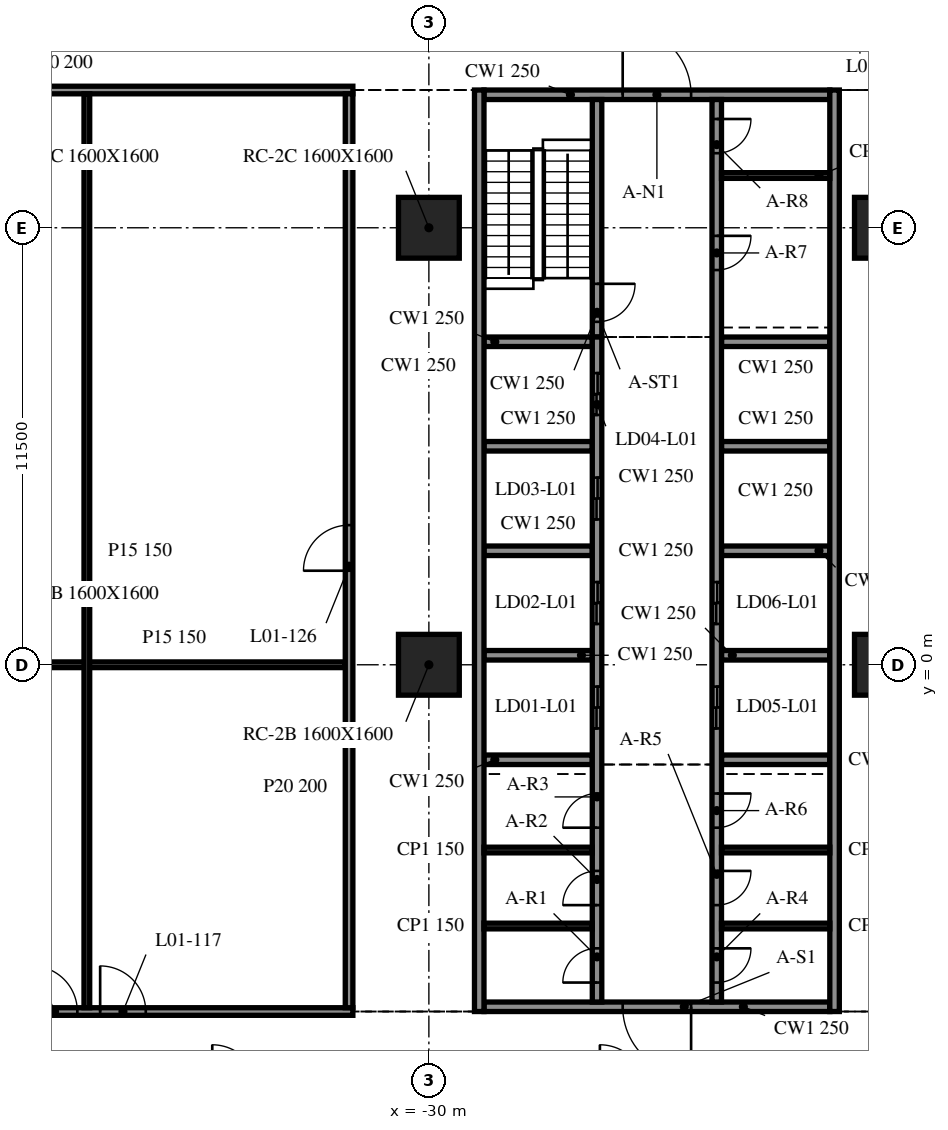
"""IFC4 building model, lengths in metres.
Left out: names, types, materials, properties, quantities, classifications, styles, units other than length and angle.
Written with IfcOpenShell. Run it as: python <this file> out.ifc"""

import sys

from ifc_helpers import new_model, si_unit, direction, frame, frame_2d, origin, origin_2d, place, context, subcontext, project, spatial, rectangle, extrude, element, fill, save


model = new_model("IFC4")
c1 = context("Model", 3, precision=1e-05, world=origin(), true_north=direction((0.0, 1.0)))
c2 = subcontext(c1, "Body", "Model", "MODEL_VIEW")
j1 = project(units=[si_unit("LENGTHUNIT", "METRE"), si_unit("PLANEANGLEUNIT", "RADIAN")], contexts=[c1])
p1 = place(None, origin())
s1 = spatial("IfcSite", under=j1, at=p1, CompositionType="ELEMENT")
p2 = place(p1, origin())
s2 = spatial("IfcBuilding", under=s1, at=p2, CompositionType="ELEMENT")
p3 = place(p2, frame((0.0, 0.0, 7.2)))
s3 = spatial("IfcBuildingStorey", under=s2, at=p3, CompositionType="ELEMENT", Elevation=7.2)
for number, where, z_axis, x_axis in (
    (1, (-30.0, 0.0, -0.34), (0.0, 0.0, 1.0), (1.0, 0.0, 0.0)),
    (2, (-30.0, 11.5, -0.34), (0.0, 0.0, 1.0), (1.0, 0.0, 0.0)),
    (3, (-18.0, 0.0, -0.34), (0.0, 0.0, 1.0), (1.0, 0.0, 0.0)),
    (4, (-18.0, 11.5, -0.34), (0.0, 0.0, 1.0), (1.0, 0.0, 0.0)),
):
    element("IfcColumn", number, at=place(p3, frame(where, z_axis=z_axis, x_axis=x_axis)), inside=s3, PredefinedType="COLUMN", context=c2, shape_type="SweptSolid", body=[
        extrude(rectangle(XDim=1.6, YDim=1.6, at=origin_2d()), origin(), (0.0, 0.0, 1.0), 4.3),
    ])
for number, where, z_axis, x_axis in (
    (5, (-28.675, 15.125, 0.0), (0.0, 0.0, 1.0), (0.0, -1.0, 0.0)),
    (6, (-19.325, -9.125, 0.0), (0.0, 0.0, 1.0), (0.0, 1.0, 0.0)),
):
    element("IfcWall", number, at=place(p3, frame(where, z_axis=z_axis, x_axis=x_axis)), inside=s3, PredefinedType="SOLIDWALL", context=c2, shape_type="SweptSolid", body=[
        extrude(rectangle(XDim=24.25, YDim=0.25, at=frame_2d((12.125, 0.0))), origin(), (0.0, 0.0, 1.0), 3.96),
    ])
p4 = place(p3, frame((-19.45, -9.0, 0.0), z_axis=(0.0, 0.0, 1.0), x_axis=(-1.0, 0.0, 0.0)))
e7 = element("IfcWall", 7, at=p4, inside=s3, PredefinedType="SOLIDWALL", context=c2, shape_type="SweptSolid", body=[
    extrude(rectangle(XDim=9.1, YDim=0.25, at=frame_2d((4.55, 0.0))), origin(), (0.0, 0.0, 1.0), 3.96),
])
p5 = place(p4, frame((3.65, 0.0, 0.0)))
e8 = element("IfcOpeningElement", 8, at=p5, cuts=e7, PredefinedType="OPENING", context=c2, shape_type="SweptSolid", body=[
    extrude(rectangle(XDim=1.8, YDim=2.1, at=frame_2d((0.9, 1.05))), frame((0.0, 0.135, 0.0), z_axis=(0.0, -1.0, 0.0), x_axis=(1.0, 0.0, 0.0)), (0.0, 0.0, 1.0), 0.27),
])
p6 = place(p3, frame((-28.55, 15.0, 0.0), z_axis=(0.0, 0.0, 1.0), x_axis=(1.0, 0.0, 0.0)))
e9 = element("IfcWall", 9, at=p6, inside=s3, PredefinedType="SOLIDWALL", context=c2, shape_type="SweptSolid", body=[
    extrude(rectangle(XDim=9.1, YDim=0.25, at=frame_2d((4.55, 0.0))), origin(), (0.0, 0.0, 1.0), 3.96),
])
p7 = place(p6, frame((3.65, 0.0, 0.0)))
e10 = element("IfcOpeningElement", 10, at=p7, cuts=e9, PredefinedType="OPENING", context=c2, shape_type="SweptSolid", body=[
    extrude(rectangle(XDim=1.8, YDim=2.1, at=frame_2d((0.9, 1.05))), frame((0.0, 0.135, 0.0), z_axis=(0.0, -1.0, 0.0), x_axis=(1.0, 0.0, 0.0)), (0.0, 0.0, 1.0), 0.27),
])
p8 = place(p3, frame((-25.575, -8.875, 0.0), z_axis=(0.0, 0.0, 1.0), x_axis=(0.0, 1.0, 0.0)))
e11 = element("IfcWall", 11, at=p8, inside=s3, PredefinedType="SOLIDWALL", context=c2, shape_type="SweptSolid", body=[
    extrude(rectangle(XDim=17.5, YDim=0.25, at=frame_2d((8.75, 0.0))), origin(), (0.0, 0.0, 1.0), 3.96),
])
p9 = place(p8, frame((7.2, 0.0, 0.0)))
e12 = element("IfcOpeningElement", 12, at=p9, cuts=e11, PredefinedType="OPENING", context=c2, shape_type="SweptSolid", body=[
    extrude(rectangle(XDim=1.1, YDim=2.1, at=frame_2d((0.55, 1.05))), frame((0.0, 0.135, 0.0), z_axis=(0.0, -1.0, 0.0), x_axis=(1.0, 0.0, 0.0)), (0.0, 0.0, 1.0), 0.27),
])
p10 = place(p8, frame((9.95, 0.0, 0.0)))
e13 = element("IfcOpeningElement", 13, at=p10, cuts=e11, PredefinedType="OPENING", context=c2, shape_type="SweptSolid", body=[
    extrude(rectangle(XDim=1.1, YDim=2.1, at=frame_2d((0.55, 1.05))), frame((0.0, 0.135, 0.0), z_axis=(0.0, -1.0, 0.0), x_axis=(1.0, 0.0, 0.0)), (0.0, 0.0, 1.0), 0.27),
])
p11 = place(p8, frame((12.7, 0.0, 0.0)))
e14 = element("IfcOpeningElement", 14, at=p11, cuts=e11, PredefinedType="OPENING", context=c2, shape_type="SweptSolid", body=[
    extrude(rectangle(XDim=1.1, YDim=2.1, at=frame_2d((0.55, 1.05))), frame((0.0, 0.135, 0.0), z_axis=(0.0, -1.0, 0.0), x_axis=(1.0, 0.0, 0.0)), (0.0, 0.0, 1.0), 0.27),
])
p12 = place(p8, frame((15.45, 0.0, 0.0)))
e15 = element("IfcOpeningElement", 15, at=p12, cuts=e11, PredefinedType="OPENING", context=c2, shape_type="SweptSolid", body=[
    extrude(rectangle(XDim=1.1, YDim=2.1, at=frame_2d((0.55, 1.05))), frame((0.0, 0.135, 0.0), z_axis=(0.0, -1.0, 0.0), x_axis=(1.0, 0.0, 0.0)), (0.0, 0.0, 1.0), 0.27),
])
p13 = place(p8, frame((0.512, 0.0, 0.0)))
e16 = element("IfcOpeningElement", 16, at=p13, cuts=e11, PredefinedType="OPENING", context=c2, shape_type="SweptSolid", body=[
    extrude(rectangle(XDim=0.9, YDim=2.1, at=frame_2d((0.45, 1.05))), frame((0.0, 0.135, 0.0), z_axis=(0.0, -1.0, 0.0), x_axis=(1.0, 0.0, 0.0)), (0.0, 0.0, 1.0), 0.27),
])
p14 = place(p8, frame((2.55, 0.0, 0.0)))
e17 = element("IfcOpeningElement", 17, at=p14, cuts=e11, PredefinedType="OPENING", context=c2, shape_type="SweptSolid", body=[
    extrude(rectangle(XDim=0.9, YDim=2.1, at=frame_2d((0.45, 1.05))), frame((0.0, 0.135, 0.0), z_axis=(0.0, -1.0, 0.0), x_axis=(1.0, 0.0, 0.0)), (0.0, 0.0, 1.0), 0.27),
])
p15 = place(p8, frame((4.587, 0.0, 0.0)))
e18 = element("IfcOpeningElement", 18, at=p15, cuts=e11, PredefinedType="OPENING", context=c2, shape_type="SweptSolid", body=[
    extrude(rectangle(XDim=0.9, YDim=2.1, at=frame_2d((0.45, 1.05))), frame((0.0, 0.135, 0.0), z_axis=(0.0, -1.0, 0.0), x_axis=(1.0, 0.0, 0.0)), (0.0, 0.0, 1.0), 0.27),
])
p16 = place(p3, frame((-25.575, 14.875, 0.0), z_axis=(0.0, 0.0, 1.0), x_axis=(0.0, -1.0, 0.0)))
e19 = element("IfcWall", 19, at=p16, inside=s3, PredefinedType="SOLIDWALL", context=c2, shape_type="SweptSolid", body=[
    extrude(rectangle(XDim=6.25, YDim=0.25, at=frame_2d((3.125, 0.0))), origin(), (0.0, 0.0, 1.0), 3.96),
])
p17 = place(p16, frame((4.85, 0.0, 0.0)))
e20 = element("IfcOpeningElement", 20, at=p17, cuts=e19, PredefinedType="OPENING", context=c2, shape_type="SweptSolid", body=[
    extrude(rectangle(XDim=1.0, YDim=2.1, at=frame_2d((0.5, 1.05))), frame((0.0, 0.135, 0.0), z_axis=(0.0, -1.0, 0.0), x_axis=(1.0, 0.0, 0.0)), (0.0, 0.0, 1.0), 0.27),
])
p18 = place(p3, frame((-22.425, 14.875, 0.0), z_axis=(0.0, 0.0, 1.0), x_axis=(0.0, -1.0, 0.0)))
e21 = element("IfcWall", 21, at=p18, inside=s3, PredefinedType="SOLIDWALL", context=c2, shape_type="SweptSolid", body=[
    extrude(rectangle(XDim=23.75, YDim=0.25, at=frame_2d((11.875, 0.0))), origin(), (0.0, 0.0, 1.0), 3.96),
])
p19 = place(p18, frame((15.45, 0.0, 0.0)))
e22 = element("IfcOpeningElement", 22, at=p19, cuts=e21, PredefinedType="OPENING", context=c2, shape_type="SweptSolid", body=[
    extrude(rectangle(XDim=1.1, YDim=2.1, at=frame_2d((0.55, 1.05))), frame((0.0, 0.135, 0.0), z_axis=(0.0, -1.0, 0.0), x_axis=(1.0, 0.0, 0.0)), (0.0, 0.0, 1.0), 0.27),
])
p20 = place(p18, frame((12.7, 0.0, 0.0)))
e23 = element("IfcOpeningElement", 23, at=p20, cuts=e21, PredefinedType="OPENING", context=c2, shape_type="SweptSolid", body=[
    extrude(rectangle(XDim=1.1, YDim=2.1, at=frame_2d((0.55, 1.05))), frame((0.0, 0.135, 0.0), z_axis=(0.0, -1.0, 0.0), x_axis=(1.0, 0.0, 0.0)), (0.0, 0.0, 1.0), 0.27),
])
p21 = place(p18, frame((22.337, 0.0, 0.0)))
e24 = element("IfcOpeningElement", 24, at=p21, cuts=e21, PredefinedType="OPENING", context=c2, shape_type="SweptSolid", body=[
    extrude(rectangle(XDim=0.9, YDim=2.1, at=frame_2d((0.45, 1.05))), frame((0.0, 0.135, 0.0), z_axis=(0.0, -1.0, 0.0), x_axis=(1.0, 0.0, 0.0)), (0.0, 0.0, 1.0), 0.27),
])
p22 = place(p18, frame((20.3, 0.0, 0.0)))
e25 = element("IfcOpeningElement", 25, at=p22, cuts=e21, PredefinedType="OPENING", context=c2, shape_type="SweptSolid", body=[
    extrude(rectangle(XDim=0.9, YDim=2.1, at=frame_2d((0.45, 1.05))), frame((0.0, 0.135, 0.0), z_axis=(0.0, -1.0, 0.0), x_axis=(1.0, 0.0, 0.0)), (0.0, 0.0, 1.0), 0.27),
])
p23 = place(p18, frame((18.262, 0.0, 0.0)))
e26 = element("IfcOpeningElement", 26, at=p23, cuts=e21, PredefinedType="OPENING", context=c2, shape_type="SweptSolid", body=[
    extrude(rectangle(XDim=0.9, YDim=2.1, at=frame_2d((0.45, 1.05))), frame((0.0, 0.135, 0.0), z_axis=(0.0, -1.0, 0.0), x_axis=(1.0, 0.0, 0.0)), (0.0, 0.0, 1.0), 0.27),
])
p24 = place(p18, frame((3.587, 0.0, 0.0)))
e27 = element("IfcOpeningElement", 27, at=p24, cuts=e21, PredefinedType="OPENING", context=c2, shape_type="SweptSolid", body=[
    extrude(rectangle(XDim=0.9, YDim=2.1, at=frame_2d((0.45, 1.05))), frame((0.0, 0.135, 0.0), z_axis=(0.0, -1.0, 0.0), x_axis=(1.0, 0.0, 0.0)), (0.0, 0.0, 1.0), 0.27),
])
p25 = place(p18, frame((0.512, 0.0, 0.0)))
e28 = element("IfcOpeningElement", 28, at=p25, cuts=e21, PredefinedType="OPENING", context=c2, shape_type="SweptSolid", body=[
    extrude(rectangle(XDim=0.9, YDim=2.1, at=frame_2d((0.45, 1.05))), frame((0.0, 0.135, 0.0), z_axis=(0.0, -1.0, 0.0), x_axis=(1.0, 0.0, 0.0)), (0.0, 0.0, 1.0), 0.27),
])
for number, where, z_axis, x_axis in (
    (29, (-28.55, -2.5, 0.0), (0.0, 0.0, 1.0), (1.0, 0.0, 0.0)),
    (30, (-28.55, 0.25, 0.0), (0.0, 0.0, 1.0), (1.0, 0.0, 0.0)),
    (31, (-28.55, 3.0, 0.0), (0.0, 0.0, 1.0), (1.0, 0.0, 0.0)),
    (32, (-28.55, 5.75, 0.0), (0.0, 0.0, 1.0), (1.0, 0.0, 0.0)),
    (33, (-28.55, 8.5, 0.0), (0.0, 0.0, 1.0), (1.0, 0.0, 0.0)),
    (34, (-22.3, -2.5, 0.0), (0.0, 0.0, 1.0), (1.0, 0.0, 0.0)),
    (35, (-22.3, 0.25, 0.0), (0.0, 0.0, 1.0), (1.0, 0.0, 0.0)),
    (36, (-22.3, 3.0, 0.0), (0.0, 0.0, 1.0), (1.0, 0.0, 0.0)),
    (37, (-22.3, 5.75, 0.0), (0.0, 0.0, 1.0), (1.0, 0.0, 0.0)),
    (38, (-22.3, 8.5, 0.0), (0.0, 0.0, 1.0), (1.0, 0.0, 0.0)),
):
    element("IfcWall", number, at=place(p3, frame(where, z_axis=z_axis, x_axis=x_axis)), inside=s3, PredefinedType="SOLIDWALL", context=c2, shape_type="SweptSolid", body=[
        extrude(rectangle(XDim=2.85, YDim=0.25, at=frame_2d((1.425, 0.0))), origin(), (0.0, 0.0, 1.0), 3.96),
    ])
for number, where, z_axis, x_axis in (
    (39, (-28.55, -6.875, 0.0), (0.0, 0.0, 1.0), (1.0, 0.0, 0.0)),
    (40, (-28.55, -4.875, 0.0), (0.0, 0.0, 1.0), (1.0, 0.0, 0.0)),
    (41, (-22.3, -6.875, 0.0), (0.0, 0.0, 1.0), (1.0, 0.0, 0.0)),
    (42, (-22.3, -4.875, 0.0), (0.0, 0.0, 1.0), (1.0, 0.0, 0.0)),
    (43, (-22.3, 12.875, 0.0), (0.0, 0.0, 1.0), (1.0, 0.0, 0.0)),
):
    element("IfcWall", number, at=place(p3, frame(where, z_axis=z_axis, x_axis=x_axis)), inside=s3, PredefinedType="PARTITIONING", context=c2, shape_type="SweptSolid", body=[
        extrude(rectangle(XDim=2.85, YDim=0.15, at=frame_2d((1.425, 0.0))), origin(), (0.0, 0.0, 1.0), 3.96),
    ])
p26 = place(p3, frame((-45.95, -9.125, 0.0), z_axis=(0.0, 0.0, 1.0), x_axis=(1.0, 0.0, 0.0)))
e44 = element("IfcWall", 44, at=p26, inside=s3, PredefinedType="PARTITIONING", context=c2, shape_type="SweptSolid", body=[
    extrude(rectangle(XDim=13.95, YDim=0.2, at=frame_2d((6.975, 0.0))), origin(), (0.0, 0.0, 1.0), 3.96),
])
p27 = place(p26, frame((5.5, 0.0, 0.0)))
e45 = element("IfcOpeningElement", 45, at=p27, cuts=e44, PredefinedType="OPENING", context=c2, shape_type="SweptSolid", body=[
    extrude(rectangle(XDim=1.2, YDim=2.1, at=frame_2d((0.6, 1.05))), frame((0.0, 0.11, 0.0), z_axis=(0.0, -1.0, 0.0), x_axis=(1.0, 0.0, 0.0)), (0.0, 0.0, 1.0), 0.22),
])
p28 = place(p26, frame((7.3, 0.0, 0.0)))
e46 = element("IfcOpeningElement", 46, at=p28, cuts=e44, PredefinedType="OPENING", context=c2, shape_type="SweptSolid", body=[
    extrude(rectangle(XDim=1.2, YDim=2.1, at=frame_2d((0.6, 1.05))), frame((0.0, 0.11, 0.0), z_axis=(0.0, -1.0, 0.0), x_axis=(1.0, 0.0, 0.0)), (0.0, 0.0, 1.0), 0.22),
])
p29 = place(p3, frame((-41.2, 0.0, 0.0), z_axis=(0.0, 0.0, 1.0), x_axis=(1.0, 0.0, 0.0)))
e47 = element("IfcWall", 47, at=p29, inside=s3, PredefinedType="PARTITIONING", context=c2, shape_type="SweptSolid", body=[
    extrude(rectangle(XDim=9.0, YDim=0.15, at=frame_2d((4.5, 0.0))), origin(), (0.0, 0.0, 1.0), 3.96),
])
p30 = place(p3, frame((-45.95, 15.125, 0.0), z_axis=(0.0, 0.0, 1.0), x_axis=(1.0, 0.0, 0.0)))
e48 = element("IfcWall", 48, at=p30, inside=s3, PredefinedType="PARTITIONING", context=c2, shape_type="SweptSolid", body=[
    extrude(rectangle(XDim=13.95, YDim=0.2, at=frame_2d((6.975, 0.0))), origin(), (0.0, 0.0, 1.0), 3.96),
])
p31 = place(p3, frame((-39.0, -9.025, 0.0), z_axis=(0.0, 0.0, 1.0), x_axis=(0.0, 1.0, 0.0)))
e49 = element("IfcWall", 49, at=p31, inside=s3, PredefinedType="PARTITIONING", context=c2, shape_type="SweptSolid", body=[
    extrude(rectangle(XDim=24.05, YDim=0.15, at=frame_2d((12.025, 0.0))), origin(), (0.0, 0.0, 1.0), 3.96),
])
p32 = place(p3, frame((-32.1, -9.025, 0.0), z_axis=(0.0, 0.0, 1.0), x_axis=(0.0, 1.0, 0.0)))
e50 = element("IfcWall", 50, at=p32, inside=s3, PredefinedType="PARTITIONING", context=c2, shape_type="SweptSolid", body=[
    extrude(rectangle(XDim=24.05, YDim=0.2, at=frame_2d((12.025, 0.0))), origin(), (0.0, 0.0, 1.0), 3.96),
])
p33 = place(p32, frame((11.5, 0.0, 0.0)))
e51 = element("IfcOpeningElement", 51, at=p33, cuts=e50, PredefinedType="OPENING", context=c2, shape_type="SweptSolid", body=[
    extrude(rectangle(XDim=1.2, YDim=2.1, at=frame_2d((0.6, 1.05))), frame((0.0, 0.11, 0.0), z_axis=(0.0, -1.0, 0.0), x_axis=(1.0, 0.0, 0.0)), (0.0, 0.0, 1.0), 0.22),
])
p34 = place(p5, origin())
e52 = element("IfcDoor", 52, at=p34, inside=s3, OperationType="DOUBLE_DOOR_SINGLE_SWING", PredefinedType="DOOR", context=c2, shape_type="SweptSolid", body=[
    extrude(rectangle(XDim=1.8, YDim=2.1, at=frame_2d((0.9, 1.05))), frame((0.0, 0.025, 0.0), z_axis=(0.0, -1.0, 0.0), x_axis=(1.0, 0.0, 0.0)), (0.0, 0.0, 1.0), 0.05),
])
fill(e8, e52)
p35 = place(p7, origin())
e53 = element("IfcDoor", 53, at=p35, inside=s3, OperationType="DOUBLE_DOOR_SINGLE_SWING", PredefinedType="DOOR", context=c2, shape_type="SweptSolid", body=[
    extrude(rectangle(XDim=1.8, YDim=2.1, at=frame_2d((0.9, 1.05))), frame((0.0, 0.025, 0.0), z_axis=(0.0, -1.0, 0.0), x_axis=(1.0, 0.0, 0.0)), (0.0, 0.0, 1.0), 0.05),
])
fill(e10, e53)
p36 = place(p19, origin())
e54 = element("IfcDoor", 54, at=p36, inside=s3, OperationType="DOUBLE_DOOR_SLIDING", PredefinedType="DOOR", context=c2, shape_type="SweptSolid", body=[
    extrude(rectangle(XDim=1.1, YDim=2.1, at=frame_2d((0.55, 1.05))), frame((0.0, 0.025, 0.0), z_axis=(0.0, -1.0, 0.0), x_axis=(1.0, 0.0, 0.0)), (0.0, 0.0, 1.0), 0.05),
])
fill(e22, e54)
p37 = place(p20, origin())
e55 = element("IfcDoor", 55, at=p37, inside=s3, OperationType="DOUBLE_DOOR_SLIDING", PredefinedType="DOOR", context=c2, shape_type="SweptSolid", body=[
    extrude(rectangle(XDim=1.1, YDim=2.1, at=frame_2d((0.55, 1.05))), frame((0.0, 0.025, 0.0), z_axis=(0.0, -1.0, 0.0), x_axis=(1.0, 0.0, 0.0)), (0.0, 0.0, 1.0), 0.05),
])
fill(e23, e55)
p38 = place(p9, origin())
e56 = element("IfcDoor", 56, at=p38, inside=s3, OperationType="DOUBLE_DOOR_SLIDING", PredefinedType="DOOR", context=c2, shape_type="SweptSolid", body=[
    extrude(rectangle(XDim=1.1, YDim=2.1, at=frame_2d((0.55, 1.05))), frame((0.0, 0.025, 0.0), z_axis=(0.0, -1.0, 0.0), x_axis=(1.0, 0.0, 0.0)), (0.0, 0.0, 1.0), 0.05),
])
fill(e12, e56)
p39 = place(p10, origin())
e57 = element("IfcDoor", 57, at=p39, inside=s3, OperationType="DOUBLE_DOOR_SLIDING", PredefinedType="DOOR", context=c2, shape_type="SweptSolid", body=[
    extrude(rectangle(XDim=1.1, YDim=2.1, at=frame_2d((0.55, 1.05))), frame((0.0, 0.025, 0.0), z_axis=(0.0, -1.0, 0.0), x_axis=(1.0, 0.0, 0.0)), (0.0, 0.0, 1.0), 0.05),
])
fill(e13, e57)
p40 = place(p11, origin())
e58 = element("IfcDoor", 58, at=p40, inside=s3, OperationType="DOUBLE_DOOR_SLIDING", PredefinedType="DOOR", context=c2, shape_type="SweptSolid", body=[
    extrude(rectangle(XDim=1.1, YDim=2.1, at=frame_2d((0.55, 1.05))), frame((0.0, 0.025, 0.0), z_axis=(0.0, -1.0, 0.0), x_axis=(1.0, 0.0, 0.0)), (0.0, 0.0, 1.0), 0.05),
])
fill(e14, e58)
p41 = place(p12, origin())
e59 = element("IfcDoor", 59, at=p41, inside=s3, OperationType="DOUBLE_DOOR_SLIDING", PredefinedType="DOOR", context=c2, shape_type="SweptSolid", body=[
    extrude(rectangle(XDim=1.1, YDim=2.1, at=frame_2d((0.55, 1.05))), frame((0.0, 0.025, 0.0), z_axis=(0.0, -1.0, 0.0), x_axis=(1.0, 0.0, 0.0)), (0.0, 0.0, 1.0), 0.05),
])
fill(e15, e59)
p42 = place(p13, origin())
e60 = element("IfcDoor", 60, at=p42, inside=s3, OperationType="SINGLE_SWING_LEFT", PredefinedType="DOOR", context=c2, shape_type="SweptSolid", body=[
    extrude(rectangle(XDim=0.9, YDim=2.1, at=frame_2d((0.45, 1.05))), frame((0.0, 0.025, 0.0), z_axis=(0.0, -1.0, 0.0), x_axis=(1.0, 0.0, 0.0)), (0.0, 0.0, 1.0), 0.05),
])
fill(e16, e60)
p43 = place(p14, origin())
e61 = element("IfcDoor", 61, at=p43, inside=s3, OperationType="SINGLE_SWING_RIGHT", PredefinedType="DOOR", context=c2, shape_type="SweptSolid", body=[
    extrude(rectangle(XDim=0.9, YDim=2.1, at=frame_2d((0.45, 1.05))), frame((0.0, 0.025, 0.0), z_axis=(0.0, -1.0, 0.0), x_axis=(1.0, 0.0, 0.0)), (0.0, 0.0, 1.0), 0.05),
])
fill(e17, e61)
p44 = place(p15, origin())
e62 = element("IfcDoor", 62, at=p44, inside=s3, OperationType="SINGLE_SWING_LEFT", PredefinedType="DOOR", context=c2, shape_type="SweptSolid", body=[
    extrude(rectangle(XDim=0.9, YDim=2.1, at=frame_2d((0.45, 1.05))), frame((0.0, 0.025, 0.0), z_axis=(0.0, -1.0, 0.0), x_axis=(1.0, 0.0, 0.0)), (0.0, 0.0, 1.0), 0.05),
])
fill(e18, e62)
p45 = place(p21, origin())
e63 = element("IfcDoor", 63, at=p45, inside=s3, OperationType="SINGLE_SWING_RIGHT", PredefinedType="DOOR", context=c2, shape_type="SweptSolid", body=[
    extrude(rectangle(XDim=0.9, YDim=2.1, at=frame_2d((0.45, 1.05))), frame((0.0, 0.025, 0.0), z_axis=(0.0, -1.0, 0.0), x_axis=(1.0, 0.0, 0.0)), (0.0, 0.0, 1.0), 0.05),
])
fill(e24, e63)
p46 = place(p22, origin())
e64 = element("IfcDoor", 64, at=p46, inside=s3, OperationType="SINGLE_SWING_LEFT", PredefinedType="DOOR", context=c2, shape_type="SweptSolid", body=[
    extrude(rectangle(XDim=0.9, YDim=2.1, at=frame_2d((0.45, 1.05))), frame((0.0, 0.025, 0.0), z_axis=(0.0, -1.0, 0.0), x_axis=(1.0, 0.0, 0.0)), (0.0, 0.0, 1.0), 0.05),
])
fill(e25, e64)
p47 = place(p23, origin())
e65 = element("IfcDoor", 65, at=p47, inside=s3, OperationType="SINGLE_SWING_RIGHT", PredefinedType="DOOR", context=c2, shape_type="SweptSolid", body=[
    extrude(rectangle(XDim=0.9, YDim=2.1, at=frame_2d((0.45, 1.05))), frame((0.0, 0.025, 0.0), z_axis=(0.0, -1.0, 0.0), x_axis=(1.0, 0.0, 0.0)), (0.0, 0.0, 1.0), 0.05),
])
fill(e26, e65)
p48 = place(p24, origin())
e66 = element("IfcDoor", 66, at=p48, inside=s3, OperationType="SINGLE_SWING_LEFT", PredefinedType="DOOR", context=c2, shape_type="SweptSolid", body=[
    extrude(rectangle(XDim=0.9, YDim=2.1, at=frame_2d((0.45, 1.05))), frame((0.0, 0.025, 0.0), z_axis=(0.0, -1.0, 0.0), x_axis=(1.0, 0.0, 0.0)), (0.0, 0.0, 1.0), 0.05),
])
fill(e27, e66)
p49 = place(p25, origin())
e67 = element("IfcDoor", 67, at=p49, inside=s3, OperationType="SINGLE_SWING_RIGHT", PredefinedType="DOOR", context=c2, shape_type="SweptSolid", body=[
    extrude(rectangle(XDim=0.9, YDim=2.1, at=frame_2d((0.45, 1.05))), frame((0.0, 0.025, 0.0), z_axis=(0.0, -1.0, 0.0), x_axis=(1.0, 0.0, 0.0)), (0.0, 0.0, 1.0), 0.05),
])
fill(e28, e67)
p50 = place(p17, origin())
e68 = element("IfcDoor", 68, at=p50, inside=s3, OperationType="SINGLE_SWING_LEFT", PredefinedType="DOOR", context=c2, shape_type="SweptSolid", body=[
    extrude(rectangle(XDim=1.0, YDim=2.1, at=frame_2d((0.5, 1.05))), frame((0.0, 0.025, 0.0), z_axis=(0.0, -1.0, 0.0), x_axis=(1.0, 0.0, 0.0)), (0.0, 0.0, 1.0), 0.05),
])
fill(e20, e68)
p51 = place(p27, origin())
e69 = element("IfcDoor", 69, at=p51, inside=s3, OperationType="SINGLE_SWING_LEFT", PredefinedType="DOOR", context=c2, shape_type="SweptSolid", body=[
    extrude(rectangle(XDim=1.2, YDim=2.1, at=frame_2d((0.6, 1.05))), frame((0.0, 0.025, 0.0), z_axis=(0.0, -1.0, 0.0), x_axis=(1.0, 0.0, 0.0)), (0.0, 0.0, 1.0), 0.05),
])
fill(e45, e69)
p52 = place(p28, origin())
e70 = element("IfcDoor", 70, at=p52, inside=s3, OperationType="SINGLE_SWING_RIGHT", PredefinedType="DOOR", context=c2, shape_type="SweptSolid", body=[
    extrude(rectangle(XDim=1.2, YDim=2.1, at=frame_2d((0.6, 1.05))), frame((0.0, 0.025, 0.0), z_axis=(0.0, -1.0, 0.0), x_axis=(1.0, 0.0, 0.0)), (0.0, 0.0, 1.0), 0.05),
])
fill(e46, e70)
p53 = place(p33, origin())
e71 = element("IfcDoor", 71, at=p53, inside=s3, OperationType="SINGLE_SWING_RIGHT", PredefinedType="DOOR", context=c2, shape_type="SweptSolid", body=[
    extrude(rectangle(XDim=1.2, YDim=2.1, at=frame_2d((0.6, 1.05))), frame((0.0, 0.025, 0.0), z_axis=(0.0, -1.0, 0.0), x_axis=(1.0, 0.0, 0.0)), (0.0, 0.0, 1.0), 0.05),
])
fill(e51, e71)
save(model, sys.argv[1])
